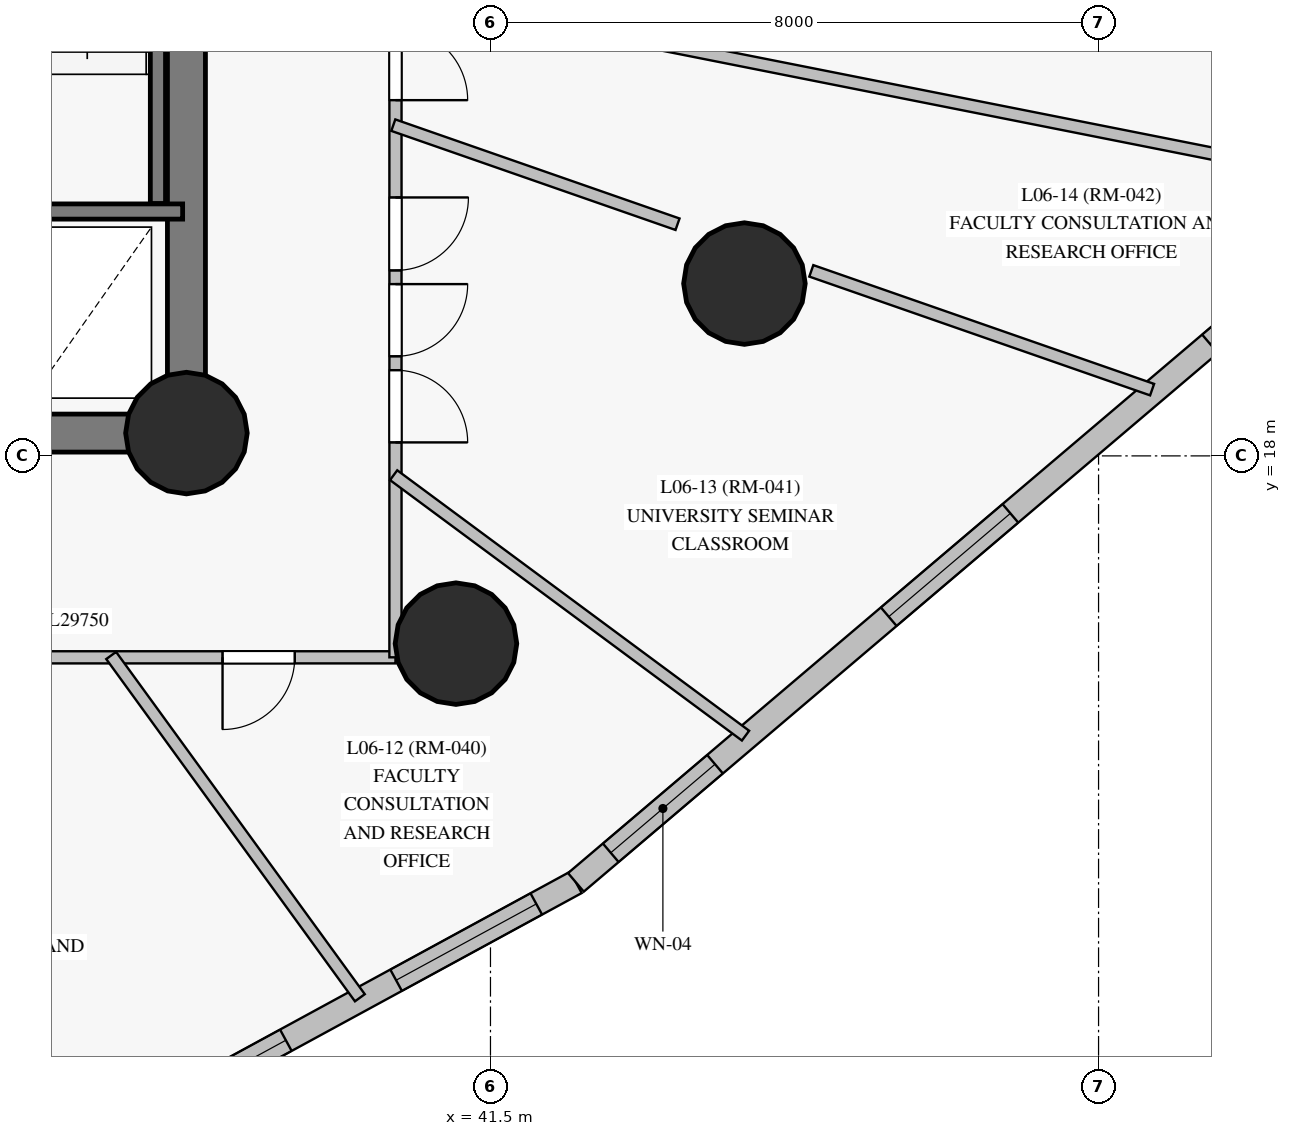
"""IFC4 building model, lengths in metres.
Left out: names, types, materials, properties, quantities, classifications, styles, units other than length and angle.
Written with IfcOpenShell. Run it as: python <this file> out.ifc"""

import sys

from ifc_helpers import new_model, si_unit, direction, frame, frame_2d, origin, origin_with_axes, origin_2d, place, context, subcontext, project, spatial, rectangle, circle, extrude, source, transform, mapped, element, fill, save


model = new_model("IFC4")
c1 = context("Model", 3, precision=1e-05, world=origin(), true_north=direction((0.0, 1.0)))
c2 = subcontext(c1, "Body", "Model", "MODEL_VIEW")
j1 = project(units=[si_unit("LENGTHUNIT", "METRE"), si_unit("PLANEANGLEUNIT", "RADIAN")], contexts=[c1])
p1 = place(None, origin())
s1 = spatial("IfcSite", under=j1, at=p1, CompositionType="ELEMENT")
p2 = place(p1, origin())
s2 = spatial("IfcBuilding", under=s1, at=p2, CompositionType="ELEMENT")
p3 = place(p2, frame((0.0, 0.0, 26.5)))
s3 = spatial("IfcBuildingStorey", under=s2, at=p3, CompositionType="ELEMENT", Elevation=26.5)
p4 = place(p3, frame((26.55, 18.3, 0.0), z_axis=(0.0, 0.0, 1.0), x_axis=(1.0, 0.0, 0.0)))
e1 = element("IfcWall", 1, at=p4, inside=s3, PredefinedType="SHEAR", context=c2, shape_type="SweptSolid", body=[
    extrude(rectangle(XDim=10.95, YDim=0.5, at=frame_2d((5.475, 0.0))), origin(), (0.0, 0.0, 1.0), 3.35),
])
p5 = place(p4, frame((4.55, 0.0, 0.0)))
e2 = element("IfcOpeningElement", 2, at=p5, cuts=e1, PredefinedType="OPENING", context=c2, shape_type="SweptSolid", body=[
    extrude(rectangle(XDim=1.4, YDim=2.2, at=frame_2d((0.7, 1.1))), frame((0.0, 0.26, 0.0), z_axis=(0.0, -1.0, 0.0), x_axis=(1.0, 0.0, 0.0)), (0.0, 0.0, 1.0), 0.52),
])
p6 = place(p3, frame((37.5, 18.3, 0.0), z_axis=(0.0, 0.0, 1.0), x_axis=(0.0, 1.0, 0.0)))
e3 = element("IfcWall", 3, at=p6, inside=s3, PredefinedType="SHEAR", context=c2, shape_type="SweptSolid", body=[
    extrude(rectangle(XDim=16.4, YDim=0.5, at=frame_2d((8.2, 0.0))), origin(), (0.0, 0.0, 1.0), 3.35),
])
p7 = place(p6, frame((14.06, 0.0, 0.0)))
e4 = element("IfcOpeningElement", 4, at=p7, cuts=e3, PredefinedType="OPENING", context=c2, shape_type="SweptSolid", body=[
    extrude(rectangle(XDim=1.2, YDim=2.15, at=frame_2d((0.6, 1.075))), frame((0.0, 0.26, 0.0), z_axis=(0.0, -1.0, 0.0), x_axis=(1.0, 0.0, 0.0)), (0.0, 0.0, 1.0), 0.52),
])
m1 = source(origin_with_axes(), c2, "Body", "SweptSolid", [
    extrude(circle(Radius=0.8, at=origin_2d()), origin(), (0.0, 0.0, 1.0), 3.6),
])
for number, where, z_axis, x_axis in (
    (5, (37.5, 18.3, 0.0), (0.0, 0.0, 1.0), (1.0, 0.0, 0.0)),
    (6, (44.841, 20.267, 0.0), (0.0, 0.0, 1.0), (1.0, 0.0, 0.0)),
    (7, (41.046, 15.53, 0.0), (0.0, 0.0, 1.0), (1.0, 0.0, 0.0)),
):
    element("IfcColumn", number, at=place(p3, frame(where, z_axis=z_axis, x_axis=x_axis)), inside=s3, PredefinedType="COLUMN", context=c2, shape_type="MappedRepresentation", body=[
        mapped(m1, transform((0.0, 0.0, 0.0), scale=1.0)),
    ])
p8 = place(p3, frame((32.683, 6.978, 0.0), z_axis=(0.0, 0.0, 1.0), x_axis=(0.878311519502, 0.478088772833, 0.0)))
e8 = element("IfcWall", 8, at=p8, inside=s3, PredefinedType="SOLIDWALL", context=c2, shape_type="SweptSolid", body=[
    extrude(rectangle(XDim=11.319, YDim=0.32, at=frame_2d((5.659, 0.0))), origin(), (0.0, 0.0, 1.0), 3.35),
])
p9 = place(p8, frame((1.178, 0.0, 0.85)))
e9 = element("IfcOpeningElement", 9, at=p9, cuts=e8, PredefinedType="OPENING", context=c2, shape_type="SweptSolid", body=[
    extrude(rectangle(XDim=2.1, YDim=1.95, at=frame_2d((1.05, 0.975))), frame((0.0, 0.17, 0.0), z_axis=(0.0, -1.0, 0.0), x_axis=(1.0, 0.0, 0.0)), (0.0, 0.0, 1.0), 0.34),
])
p10 = place(p8, frame((4.874, 0.0, 0.85)))
e10 = element("IfcOpeningElement", 10, at=p10, cuts=e8, PredefinedType="OPENING", context=c2, shape_type="SweptSolid", body=[
    extrude(rectangle(XDim=2.1, YDim=1.95, at=frame_2d((1.05, 0.975))), frame((0.0, 0.17, 0.0), z_axis=(0.0, -1.0, 0.0), x_axis=(1.0, 0.0, 0.0)), (0.0, 0.0, 1.0), 0.34),
])
p11 = place(p8, frame((8.625, 0.0, 0.85)))
e11 = element("IfcOpeningElement", 11, at=p11, cuts=e8, PredefinedType="OPENING", context=c2, shape_type="SweptSolid", body=[
    extrude(rectangle(XDim=2.1, YDim=1.95, at=frame_2d((1.05, 0.975))), frame((0.0, 0.17, 0.0), z_axis=(0.0, -1.0, 0.0), x_axis=(1.0, 0.0, 0.0)), (0.0, 0.0, 1.0), 0.34),
])
p12 = place(p3, frame((42.624, 12.389, 0.0), z_axis=(0.0, 0.0, 1.0), x_axis=(0.762218671229, 0.647319625247, 0.0)))
e12 = element("IfcWall", 12, at=p12, inside=s3, PredefinedType="SOLIDWALL", context=c2, shape_type="SweptSolid", body=[
    extrude(rectangle(XDim=16.276, YDim=0.32, at=frame_2d((8.138, 0.0))), origin(), (0.0, 0.0, 1.0), 3.35),
])
p13 = place(p12, frame((0.601, 0.0, 0.85)))
e13 = element("IfcOpeningElement", 13, at=p13, cuts=e12, PredefinedType="OPENING", context=c2, shape_type="SweptSolid", body=[
    extrude(rectangle(XDim=1.8, YDim=1.85, at=frame_2d((0.9, 0.925))), frame((0.0, 0.17, 0.0), z_axis=(0.0, -1.0, 0.0), x_axis=(1.0, 0.0, 0.0)), (0.0, 0.0, 1.0), 0.34),
])
p14 = place(p12, frame((5.399, 0.0, 0.85)))
e14 = element("IfcOpeningElement", 14, at=p14, cuts=e12, PredefinedType="OPENING", context=c2, shape_type="SweptSolid", body=[
    extrude(rectangle(XDim=2.1, YDim=1.95, at=frame_2d((1.05, 0.975))), frame((0.0, 0.17, 0.0), z_axis=(0.0, -1.0, 0.0), x_axis=(1.0, 0.0, 0.0)), (0.0, 0.0, 1.0), 0.34),
])
p15 = place(p12, frame((10.945, 0.0, 0.85)))
e15 = element("IfcOpeningElement", 15, at=p15, cuts=e12, PredefinedType="OPENING", context=c2, shape_type="SweptSolid", body=[
    extrude(rectangle(XDim=2.1, YDim=1.95, at=frame_2d((1.05, 0.975))), frame((0.0, 0.17, 0.0), z_axis=(0.0, -1.0, 0.0), x_axis=(1.0, 0.0, 0.0)), (0.0, 0.0, 1.0), 0.34),
])
p16 = place(p3, frame((37.125, 21.32, 0.0), z_axis=(0.0, 0.0, 1.0), x_axis=(0.0, 1.0, 0.0)))
e16 = element("IfcWall", 16, at=p16, inside=s3, PredefinedType="SHEAR", context=c2, shape_type="SweptSolid", body=[
    extrude(rectangle(XDim=7.5, YDim=0.2, at=frame_2d((3.75, 0.0))), origin(), (0.0, 0.0, 1.0), 3.35),
])
p17 = place(p3, frame((33.455, 21.215, 0.0), z_axis=(0.0, 0.0, 1.0), x_axis=(1.0, 0.0, 0.0)))
e17 = element("IfcWall", 17, at=p17, inside=s3, PredefinedType="SHEAR", context=c2, shape_type="SweptSolid", body=[
    extrude(rectangle(XDim=3.995, YDim=0.2, at=frame_2d((1.998, 0.0))), origin(), (0.0, 0.0, 1.0), 3.35),
])
p18 = place(p3, frame((40.25, 15.35, 0.0), z_axis=(0.0, 0.0, 1.0), x_axis=(-1.0, 0.0, 0.0)))
e18 = element("IfcWall", 18, at=p18, inside=s3, PredefinedType="PARTITIONING", context=c2, shape_type="SweptSolid", body=[
    extrude(rectangle(XDim=29.75, YDim=0.16, at=frame_2d((14.875, 0.0))), origin(), (0.0, 0.0, 1.0), 2.7),
])
p19 = place(p18, frame((26.803, 0.0, 0.0)))
e19 = element("IfcOpeningElement", 19, at=p19, cuts=e18, PredefinedType="OPENING", context=c2, shape_type="SweptSolid", body=[
    extrude(rectangle(XDim=0.95, YDim=2.15, at=frame_2d((0.475, 1.075))), frame((0.0, 0.09, 0.0), z_axis=(0.0, -1.0, 0.0), x_axis=(1.0, 0.0, 0.0)), (0.0, 0.0, 1.0), 0.18),
])
p20 = place(p18, frame((23.181, 0.0, 0.0)))
e20 = element("IfcOpeningElement", 20, at=p20, cuts=e18, PredefinedType="OPENING", context=c2, shape_type="SweptSolid", body=[
    extrude(rectangle(XDim=0.95, YDim=2.15, at=frame_2d((0.475, 1.075))), frame((0.0, 0.09, 0.0), z_axis=(0.0, -1.0, 0.0), x_axis=(1.0, 0.0, 0.0)), (0.0, 0.0, 1.0), 0.18),
])
p21 = place(p18, frame((21.097, 0.0, 0.0)))
e21 = element("IfcOpeningElement", 21, at=p21, cuts=e18, PredefinedType="OPENING", context=c2, shape_type="SweptSolid", body=[
    extrude(rectangle(XDim=0.95, YDim=2.15, at=frame_2d((0.475, 1.075))), frame((0.0, 0.09, 0.0), z_axis=(0.0, -1.0, 0.0), x_axis=(1.0, 0.0, 0.0)), (0.0, 0.0, 1.0), 0.18),
])
p22 = place(p18, frame((18.772, 0.0, 0.0)))
e22 = element("IfcOpeningElement", 22, at=p22, cuts=e18, PredefinedType="OPENING", context=c2, shape_type="SweptSolid", body=[
    extrude(rectangle(XDim=0.95, YDim=2.15, at=frame_2d((0.475, 1.075))), frame((0.0, 0.09, 0.0), z_axis=(0.0, -1.0, 0.0), x_axis=(1.0, 0.0, 0.0)), (0.0, 0.0, 1.0), 0.18),
])
p23 = place(p18, frame((16.089, 0.0, 0.0)))
e23 = element("IfcOpeningElement", 23, at=p23, cuts=e18, PredefinedType="OPENING", context=c2, shape_type="SweptSolid", body=[
    extrude(rectangle(XDim=0.96, YDim=2.15, at=frame_2d((0.48, 1.075))), frame((0.0, 0.09, 0.0), z_axis=(0.0, -1.0, 0.0), x_axis=(1.0, 0.0, 0.0)), (0.0, 0.0, 1.0), 0.18),
])
p24 = place(p18, frame((14.21, 0.0, 0.0)))
e24 = element("IfcOpeningElement", 24, at=p24, cuts=e18, PredefinedType="OPENING", context=c2, shape_type="SweptSolid", body=[
    extrude(rectangle(XDim=0.95, YDim=2.15, at=frame_2d((0.475, 1.075))), frame((0.0, 0.09, 0.0), z_axis=(0.0, -1.0, 0.0), x_axis=(1.0, 0.0, 0.0)), (0.0, 0.0, 1.0), 0.18),
])
p25 = place(p18, frame((11.995, 0.0, 0.0)))
e25 = element("IfcOpeningElement", 25, at=p25, cuts=e18, PredefinedType="OPENING", context=c2, shape_type="SweptSolid", body=[
    extrude(rectangle(XDim=0.95, YDim=2.15, at=frame_2d((0.475, 1.075))), frame((0.0, 0.09, 0.0), z_axis=(0.0, -1.0, 0.0), x_axis=(1.0, 0.0, 0.0)), (0.0, 0.0, 1.0), 0.18),
])
p26 = place(p18, frame((10.127, 0.0, 0.0)))
e26 = element("IfcOpeningElement", 26, at=p26, cuts=e18, PredefinedType="OPENING", context=c2, shape_type="SweptSolid", body=[
    extrude(rectangle(XDim=0.96, YDim=2.15, at=frame_2d((0.48, 1.075))), frame((0.0, 0.09, 0.0), z_axis=(0.0, -1.0, 0.0), x_axis=(1.0, 0.0, 0.0)), (0.0, 0.0, 1.0), 0.18),
])
p27 = place(p18, frame((6.962, 0.0, 0.0)))
e27 = element("IfcOpeningElement", 27, at=p27, cuts=e18, PredefinedType="OPENING", context=c2, shape_type="SweptSolid", body=[
    extrude(rectangle(XDim=0.95, YDim=2.15, at=frame_2d((0.475, 1.075))), frame((0.0, 0.09, 0.0), z_axis=(0.0, -1.0, 0.0), x_axis=(1.0, 0.0, 0.0)), (0.0, 0.0, 1.0), 0.18),
])
p28 = place(p18, frame((1.325, 0.0, 0.0)))
e28 = element("IfcOpeningElement", 28, at=p28, cuts=e18, PredefinedType="OPENING", context=c2, shape_type="SweptSolid", body=[
    extrude(rectangle(XDim=0.95, YDim=2.15, at=frame_2d((0.475, 1.075))), frame((0.0, 0.09, 0.0), z_axis=(0.0, -1.0, 0.0), x_axis=(1.0, 0.0, 0.0)), (0.0, 0.0, 1.0), 0.18),
])
p29 = place(p3, frame((40.25, 37.65, 0.0), z_axis=(0.0, 0.0, 1.0), x_axis=(0.0, -1.0, 0.0)))
e29 = element("IfcWall", 29, at=p29, inside=s3, PredefinedType="PARTITIONING", context=c2, shape_type="SweptSolid", body=[
    extrude(rectangle(XDim=22.3, YDim=0.16, at=frame_2d((11.15, 0.0))), origin(), (0.0, 0.0, 1.0), 2.75),
])
p30 = place(p29, frame((16.25, 0.0, 0.0)))
e30 = element("IfcOpeningElement", 30, at=p30, cuts=e29, PredefinedType="OPENING", context=c2, shape_type="SweptSolid", body=[
    extrude(rectangle(XDim=0.96, YDim=2.15, at=frame_2d((0.48, 1.075))), frame((0.0, 0.09, 0.0), z_axis=(0.0, -1.0, 0.0), x_axis=(1.0, 0.0, 0.0)), (0.0, 0.0, 1.0), 0.18),
])
p31 = place(p29, frame((14.02, 0.0, 0.0)))
e31 = element("IfcOpeningElement", 31, at=p31, cuts=e29, PredefinedType="OPENING", context=c2, shape_type="SweptSolid", body=[
    extrude(rectangle(XDim=0.95, YDim=2.15, at=frame_2d((0.475, 1.075))), frame((0.0, 0.09, 0.0), z_axis=(0.0, -1.0, 0.0), x_axis=(1.0, 0.0, 0.0)), (0.0, 0.0, 1.0), 0.18),
])
p32 = place(p29, frame((12.052, 0.0, 0.0)))
e32 = element("IfcOpeningElement", 32, at=p32, cuts=e29, PredefinedType="OPENING", context=c2, shape_type="SweptSolid", body=[
    extrude(rectangle(XDim=0.95, YDim=2.15, at=frame_2d((0.475, 1.075))), frame((0.0, 0.09, 0.0), z_axis=(0.0, -1.0, 0.0), x_axis=(1.0, 0.0, 0.0)), (0.0, 0.0, 1.0), 0.18),
])
p33 = place(p29, frame((4.235, 0.0, 0.0)))
e33 = element("IfcOpeningElement", 33, at=p33, cuts=e29, PredefinedType="OPENING", context=c2, shape_type="SweptSolid", body=[
    extrude(rectangle(XDim=0.96, YDim=2.15, at=frame_2d((0.48, 1.075))), frame((0.0, 0.09, 0.0), z_axis=(0.0, -1.0, 0.0), x_axis=(1.0, 0.0, 0.0)), (0.0, 0.0, 1.0), 0.18),
])
p34 = place(p29, frame((10.45, 0.0, 0.0)))
e34 = element("IfcOpeningElement", 34, at=p34, cuts=e29, PredefinedType="OPENING", context=c2, shape_type="SweptSolid", body=[
    extrude(rectangle(XDim=0.86, YDim=2.1, at=frame_2d((0.43, 1.05))), frame((0.0, 0.09, 0.0), z_axis=(0.0, -1.0, 0.0), x_axis=(1.0, 0.0, 0.0)), (0.0, 0.0, 1.0), 0.18),
])
p35 = place(p29, frame((1.94, 0.0, 0.0)))
e35 = element("IfcOpeningElement", 35, at=p35, cuts=e29, PredefinedType="OPENING", context=c2, shape_type="SweptSolid", body=[
    extrude(rectangle(XDim=0.96, YDim=2.15, at=frame_2d((0.48, 1.075))), frame((0.0, 0.09, 0.0), z_axis=(0.0, -1.0, 0.0), x_axis=(1.0, 0.0, 0.0)), (0.0, 0.0, 1.0), 0.18),
])
p36 = place(p29, frame((17.39, 0.0, 0.0)))
e36 = element("IfcOpeningElement", 36, at=p36, cuts=e29, PredefinedType="OPENING", context=c2, shape_type="SweptSolid", body=[
    extrude(rectangle(XDim=0.95, YDim=2.15, at=frame_2d((0.475, 1.075))), frame((0.0, 0.09, 0.0), z_axis=(0.0, -1.0, 0.0), x_axis=(1.0, 0.0, 0.0)), (0.0, 0.0, 1.0), 0.18),
])
p37 = place(p29, frame((18.522, 0.0, 0.0)))
e37 = element("IfcOpeningElement", 37, at=p37, cuts=e29, PredefinedType="OPENING", context=c2, shape_type="SweptSolid", body=[
    extrude(rectangle(XDim=0.95, YDim=2.15, at=frame_2d((0.475, 1.075))), frame((0.0, 0.09, 0.0), z_axis=(0.0, -1.0, 0.0), x_axis=(1.0, 0.0, 0.0)), (0.0, 0.0, 1.0), 0.18),
])
p38 = place(p29, frame((8.331, 0.0, 0.0)))
e38 = element("IfcOpeningElement", 38, at=p38, cuts=e29, PredefinedType="OPENING", context=c2, shape_type="SweptSolid", body=[
    extrude(rectangle(XDim=0.86, YDim=2.04, at=frame_2d((0.43, 1.02))), frame((0.0, 0.09, 0.0), z_axis=(0.0, -1.0, 0.0), x_axis=(1.0, 0.0, 0.0)), (0.0, 0.0, 1.0), 0.18),
])
p39 = place(p29, frame((6.992, 0.0, 0.0)))
e39 = element("IfcOpeningElement", 39, at=p39, cuts=e29, PredefinedType="OPENING", context=c2, shape_type="SweptSolid", body=[
    extrude(rectangle(XDim=0.86, YDim=2.04, at=frame_2d((0.43, 1.02))), frame((0.0, 0.09, 0.0), z_axis=(0.0, -1.0, 0.0), x_axis=(1.0, 0.0, 0.0)), (0.0, 0.0, 1.0), 0.18),
])
p40 = place(p3, frame((40.221, 24.114, 0.0), z_axis=(0.0, 0.0, 1.0), x_axis=(0.980888341072, -0.194571483908, 0.0)))
e40 = element("IfcWall", 40, at=p40, inside=s3, PredefinedType="PARTITIONING", context=c2, shape_type="SweptSolid", body=[
    extrude(rectangle(XDim=13.346, YDim=0.16, at=frame_2d((6.673, 0.0))), origin(), (0.0, 0.0, 1.0), 3.35),
])
p41 = place(p3, frame((40.226, 17.746, 0.0), z_axis=(0.0, 0.0, 1.0), x_axis=(0.803788391649, -0.594915306116, 0.0)))
e41 = element("IfcWall", 41, at=p41, inside=s3, PredefinedType="PARTITIONING", context=c2, shape_type="SweptSolid", body=[
    extrude(rectangle(XDim=5.76, YDim=0.16, at=frame_2d((2.88, 0.0))), origin(), (0.0, 0.0, 1.0), 3.35),
])
p42 = place(p3, frame((36.51, 15.374, 0.0), z_axis=(0.0, 0.0, 1.0), x_axis=(0.587832607998, -0.808982586324, 0.0)))
e42 = element("IfcWall", 42, at=p42, inside=s3, PredefinedType="PARTITIONING", context=c2, shape_type="SweptSolid", body=[
    extrude(rectangle(XDim=5.566, YDim=0.16, at=frame_2d((2.783, 0.0))), origin(), (0.0, 0.0, 1.0), 3.35),
])
p43 = place(p3, frame((45.721, 20.434, 0.0), z_axis=(0.0, 0.0, 1.0), x_axis=(0.944286423724, -0.329124824299, 0.0)))
e43 = element("IfcWall", 43, at=p43, inside=s3, PredefinedType="PARTITIONING", context=c2, shape_type="SweptSolid", body=[
    extrude(rectangle(XDim=4.748, YDim=0.16, at=frame_2d((2.374, 0.0))), origin(), (0.0, 0.0, 1.0), 3.35),
])
p44 = place(p3, frame((40.222, 22.351, 0.0), z_axis=(0.0, 0.0, 1.0), x_axis=(0.944292001394, -0.329108821066, 0.0)))
e44 = element("IfcWall", 44, at=p44, inside=s3, PredefinedType="PARTITIONING", context=c2, shape_type="SweptSolid", body=[
    extrude(rectangle(XDim=3.96, YDim=0.16, at=frame_2d((1.98, 0.0))), origin(), (0.0, 0.0, 1.0), 3.35),
])
m2 = source(origin_with_axes(), c2, "Body", "SweptSolid", [
    extrude(rectangle(XDim=2.1, YDim=1.95, at=frame_2d((1.05, 0.975))), frame((0.0, 0.03, 0.0), z_axis=(0.0, -1.0, 0.0), x_axis=(1.0, 0.0, 0.0)), (0.0, 0.0, 1.0), 0.06),
])
p45 = place(p10, origin())
e45 = element("IfcWindow", 45, at=p45, inside=s3, PartitioningType="SINGLE_PANEL", PredefinedType="WINDOW", context=c2, shape_type="MappedRepresentation", body=[
    mapped(m2, transform((0.0, 0.0, 0.0), scale=1.0)),
])
fill(e10, e45)
p46 = place(p11, origin())
e46 = element("IfcWindow", 46, at=p46, inside=s3, PartitioningType="SINGLE_PANEL", PredefinedType="WINDOW", context=c2, shape_type="MappedRepresentation", body=[
    mapped(m2, transform((0.0, 0.0, 0.0), scale=1.0)),
])
fill(e11, e46)
m3 = source(origin_with_axes(), c2, "Body", "SweptSolid", [
    extrude(rectangle(XDim=1.8, YDim=1.85, at=frame_2d((0.9, 0.925))), frame((0.0, 0.03, 0.0), z_axis=(0.0, -1.0, 0.0), x_axis=(1.0, 0.0, 0.0)), (0.0, 0.0, 1.0), 0.06),
])
p47 = place(p13, origin())
e47 = element("IfcWindow", 47, at=p47, inside=s3, PartitioningType="SINGLE_PANEL", PredefinedType="WINDOW", context=c2, shape_type="MappedRepresentation", body=[
    mapped(m3, transform((0.0, 0.0, 0.0), scale=1.0)),
])
fill(e13, e47)
p48 = place(p14, origin())
e48 = element("IfcWindow", 48, at=p48, inside=s3, PartitioningType="SINGLE_PANEL", PredefinedType="WINDOW", context=c2, shape_type="MappedRepresentation", body=[
    mapped(m2, transform((0.0, 0.0, 0.0), scale=1.0)),
])
fill(e14, e48)
p49 = place(p15, origin())
e49 = element("IfcWindow", 49, at=p49, inside=s3, PartitioningType="SINGLE_PANEL", PredefinedType="WINDOW", context=c2, shape_type="MappedRepresentation", body=[
    mapped(m2, transform((0.0, 0.0, 0.0), scale=1.0)),
])
fill(e15, e49)
m4 = source(origin_with_axes(), c2, "Body", "SweptSolid", [
    extrude(rectangle(XDim=0.95, YDim=2.15, at=frame_2d((0.475, 1.075))), frame((0.0, 0.025, 0.0), z_axis=(0.0, -1.0, 0.0), x_axis=(1.0, 0.0, 0.0)), (0.0, 0.0, 1.0), 0.05),
])
p50 = place(p28, origin())
e50 = element("IfcDoor", 50, at=p50, inside=s3, OperationType="SINGLE_SWING_RIGHT", PredefinedType="DOOR", context=c2, shape_type="MappedRepresentation", body=[
    mapped(m4, transform((0.0, 0.0, 0.0), scale=1.0)),
])
fill(e28, e50)
m5 = source(origin_with_axes(), c2, "Body", "SweptSolid", [
    extrude(rectangle(XDim=0.96, YDim=2.15, at=frame_2d((0.48, 1.075))), frame((0.0, 0.025, 0.0), z_axis=(0.0, -1.0, 0.0), x_axis=(1.0, 0.0, 0.0)), (0.0, 0.0, 1.0), 0.05),
])
p51 = place(p30, origin())
e51 = element("IfcDoor", 51, at=p51, inside=s3, OperationType="SINGLE_SWING_LEFT", PredefinedType="DOOR", context=c2, shape_type="MappedRepresentation", body=[
    mapped(m5, transform((0.0, 0.0, 0.0), scale=1.0)),
])
fill(e30, e51)
p52 = place(p31, origin())
e52 = element("IfcDoor", 52, at=p52, inside=s3, OperationType="SINGLE_SWING_RIGHT", PredefinedType="DOOR", context=c2, shape_type="MappedRepresentation", body=[
    mapped(m4, transform((0.0, 0.0, 0.0), scale=1.0)),
])
fill(e31, e52)
p53 = place(p36, origin())
e53 = element("IfcDoor", 53, at=p53, inside=s3, OperationType="SINGLE_SWING_LEFT", PredefinedType="DOOR", context=c2, shape_type="MappedRepresentation", body=[
    mapped(m4, transform((0.0, 0.0, 0.0), scale=1.0)),
])
fill(e36, e53)
p54 = place(p37, origin())
e54 = element("IfcDoor", 54, at=p54, inside=s3, OperationType="SINGLE_SWING_RIGHT", PredefinedType="DOOR", context=c2, shape_type="MappedRepresentation", body=[
    mapped(m4, transform((0.0, 0.0, 0.0), scale=1.0)),
])
fill(e37, e54)
save(model, sys.argv[1])
